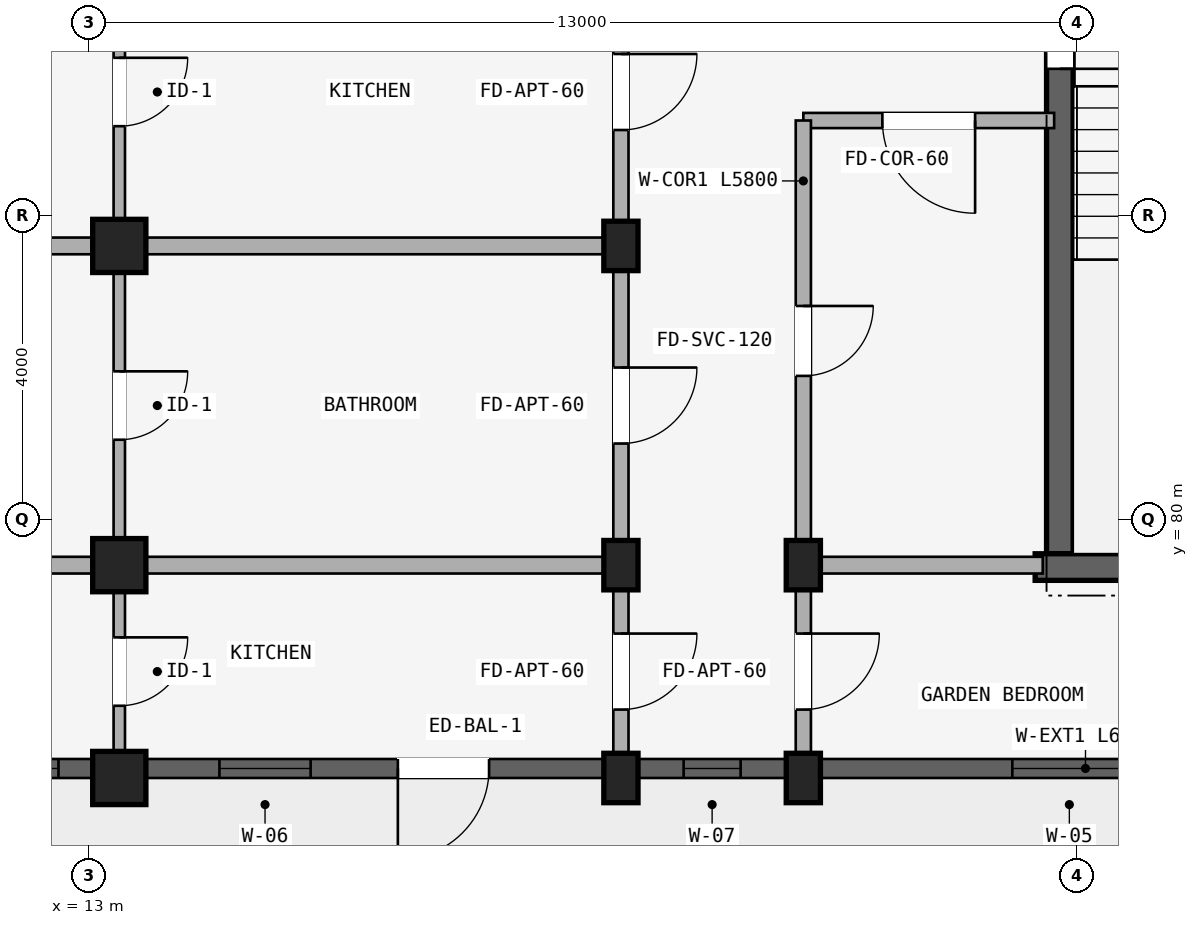
"""IFC4 building model, lengths in metres.
Left out: names, types, materials, properties, quantities, classifications, styles, units other than length and angle.
Written with IfcOpenShell. Run it as: python <this file> out.ifc"""

import sys

from ifc_helpers import new_model, si_unit, direction, frame, frame_2d, origin, origin_2d, place, context, subcontext, project, spatial, rectangle, extrude, element, fill, save


model = new_model("IFC4")
c1 = context("Model", 3, precision=1e-05, world=origin(), true_north=direction((0.0, 1.0)))
c2 = subcontext(c1, "Body", "Model", "MODEL_VIEW")
j1 = project(units=[si_unit("LENGTHUNIT", "METRE"), si_unit("PLANEANGLEUNIT", "RADIAN")], contexts=[c1])
p1 = place(None, origin())
s1 = spatial("IfcSite", under=j1, at=p1, CompositionType="ELEMENT")
p2 = place(p1, origin())
s2 = spatial("IfcBuilding", under=s1, at=p2, CompositionType="ELEMENT")
p3 = place(p2, frame((0.0, 0.0, 27.6)))
s3 = spatial("IfcBuildingStorey", under=s2, at=p3, CompositionType="ELEMENT", Elevation=27.6)
p4 = place(p3, frame((25.775, 87.45, 0.0), z_axis=(0.0, 0.0, 1.0), x_axis=(0.0, -1.0, 0.0)))
e1 = element("IfcWall", 1, at=p4, inside=s3, PredefinedType="SHEAR", context=c2, shape_type="SweptSolid", body=[
    extrude(rectangle(XDim=7.9, YDim=0.35, at=frame_2d((3.95, 0.0))), origin(), (0.0, 0.0, 1.0), 2.93),
])
p5 = place(p4, frame((0.28, 0.0, 0.0)))
e2 = element("IfcOpeningElement", 2, at=p5, cuts=e1, PredefinedType="OPENING", context=c2, shape_type="SweptSolid", body=[
    extrude(rectangle(XDim=1.24, YDim=2.15, at=frame_2d((0.62, 1.075))), frame((0.0, 0.185, 0.0), z_axis=(0.0, -1.0, 0.0), x_axis=(1.0, 0.0, 0.0)), (0.0, 0.0, 1.0), 0.37),
])
p6 = place(p3, frame((29.05, 79.375, 0.0), z_axis=(0.0, 0.0, 1.0), x_axis=(-1.0, 0.0, 0.0)))
e3 = element("IfcWall", 3, at=p6, inside=s3, PredefinedType="SHEAR", context=c2, shape_type="SweptSolid", body=[
    extrude(rectangle(XDim=3.6, YDim=0.35, at=frame_2d((1.8, 0.0))), origin(), (0.0, 0.0, 1.0), 2.93),
])
p7 = place(p3, frame((20.0, 83.6, 0.0), z_axis=(0.0, 0.0, 1.0), x_axis=(1.0, 0.0, 0.0)))
e4 = element("IfcColumn", 4, at=p7, inside=s3, PredefinedType="COLUMN", context=c2, shape_type="SweptSolid", body=[
    extrude(rectangle(XDim=0.45, YDim=0.65, at=origin_2d()), origin(), (0.0, 0.0, 1.0), 2.93),
])
p8 = place(p3, frame((13.4, 83.6, 0.0), z_axis=(0.0, 0.0, 1.0), x_axis=(1.0, 0.0, 0.0)))
e5 = element("IfcColumn", 5, at=p8, inside=s3, PredefinedType="COLUMN", context=c2, shape_type="SweptSolid", body=[
    extrude(rectangle(XDim=0.7, YDim=0.7, at=origin_2d()), origin(), (0.0, 0.0, 1.0), 2.93),
])
for number, where, z_axis, x_axis in (
    (6, (22.4, 79.4, 0.0), (0.0, 0.0, 1.0), (1.0, 0.0, 0.0)),
    (7, (20.0, 79.4, 0.0), (0.0, 0.0, 1.0), (1.0, 0.0, 0.0)),
):
    element("IfcColumn", number, at=place(p3, frame(where, z_axis=z_axis, x_axis=x_axis)), inside=s3, PredefinedType="COLUMN", context=c2, shape_type="SweptSolid", body=[
        extrude(rectangle(XDim=0.45, YDim=0.65, at=origin_2d()), origin(), (0.0, 0.0, 1.0), 2.93),
    ])
p9 = place(p3, frame((13.4, 79.4, 0.0), z_axis=(0.0, 0.0, 1.0), x_axis=(1.0, 0.0, 0.0)))
e8 = element("IfcColumn", 8, at=p9, inside=s3, PredefinedType="COLUMN", context=c2, shape_type="SweptSolid", body=[
    extrude(rectangle(XDim=0.7, YDim=0.7, at=origin_2d()), origin(), (0.0, 0.0, 1.0), 2.93),
])
for number, where, z_axis, x_axis in (
    (9, (22.4, 76.6, 0.0), (0.0, 0.0, 1.0), (1.0, 0.0, 0.0)),
    (10, (20.0, 76.6, 0.0), (0.0, 0.0, 1.0), (1.0, 0.0, 0.0)),
):
    element("IfcColumn", number, at=place(p3, frame(where, z_axis=z_axis, x_axis=x_axis)), inside=s3, PredefinedType="COLUMN", context=c2, shape_type="SweptSolid", body=[
        extrude(rectangle(XDim=0.45, YDim=0.65, at=origin_2d()), origin(), (0.0, 0.0, 1.0), 2.93),
    ])
p10 = place(p3, frame((13.4, 76.6, 0.0), z_axis=(0.0, 0.0, 1.0), x_axis=(1.0, 0.0, 0.0)))
e11 = element("IfcColumn", 11, at=p10, inside=s3, PredefinedType="COLUMN", context=c2, shape_type="SweptSolid", body=[
    extrude(rectangle(XDim=0.7, YDim=0.7, at=origin_2d()), origin(), (0.0, 0.0, 1.0), 2.93),
])
p11 = place(p3, frame((25.7, 85.25, 0.0), z_axis=(0.0, 0.0, 1.0), x_axis=(-1.0, 0.0, 0.0)))
e12 = element("IfcWall", 12, at=p11, inside=s3, PredefinedType="STANDARD", context=c2, shape_type="SweptSolid", body=[
    extrude(rectangle(XDim=3.3, YDim=0.2, at=frame_2d((1.65, 0.0))), origin(), (0.0, 0.0, 1.0), 2.372),
])
p12 = place(p11, frame((1.04, 0.0, 0.0)))
e13 = element("IfcOpeningElement", 13, at=p12, cuts=e12, PredefinedType="OPENING", context=c2, shape_type="SweptSolid", body=[
    extrude(rectangle(XDim=1.22, YDim=2.15, at=frame_2d((0.61, 1.075))), frame((0.0, 0.11, 0.0), z_axis=(0.0, -1.0, 0.0), x_axis=(1.0, 0.0, 0.0)), (0.0, 0.0, 1.0), 0.22),
])
p13 = place(p3, frame((22.4, 85.25, 0.0), z_axis=(0.0, 0.0, 1.0), x_axis=(0.0, -1.0, 0.0)))
e14 = element("IfcWall", 14, at=p13, inside=s3, PredefinedType="STANDARD", context=c2, shape_type="SweptSolid", body=[
    extrude(rectangle(XDim=5.8, YDim=0.2, at=frame_2d((2.9, 0.0))), origin(), (0.0, 0.0, 1.0), 2.372),
])
p14 = place(p13, frame((2.44, 0.0, 0.0)))
e15 = element("IfcOpeningElement", 15, at=p14, cuts=e14, PredefinedType="OPENING", context=c2, shape_type="SweptSolid", body=[
    extrude(rectangle(XDim=0.92, YDim=2.1, at=frame_2d((0.46, 1.05))), frame((0.0, 0.11, 0.0), z_axis=(0.0, -1.0, 0.0), x_axis=(1.0, 0.0, 0.0)), (0.0, 0.0, 1.0), 0.22),
])
p15 = place(p3, frame((20.0, 87.65, 0.0), z_axis=(0.0, 0.0, 1.0), x_axis=(0.0, -1.0, 0.0)))
e16 = element("IfcWall", 16, at=p15, inside=s3, PredefinedType="STANDARD", context=c2, shape_type="SweptSolid", body=[
    extrude(rectangle(XDim=4.05, YDim=0.2, at=frame_2d((2.025, 0.0))), origin(), (0.0, 0.0, 1.0), 2.372),
])
p16 = place(p15, frame((1.525, 0.0, 0.0)))
e17 = element("IfcOpeningElement", 17, at=p16, cuts=e16, PredefinedType="OPENING", context=c2, shape_type="SweptSolid", body=[
    extrude(rectangle(XDim=1.0, YDim=2.15, at=frame_2d((0.5, 1.075))), frame((0.0, 0.11, 0.0), z_axis=(0.0, -1.0, 0.0), x_axis=(1.0, 0.0, 0.0)), (0.0, 0.0, 1.0), 0.22),
])
p17 = place(p3, frame((13.4, 87.57, 0.0), z_axis=(0.0, 0.0, 1.0), x_axis=(0.0, -1.0, 0.0)))
e18 = element("IfcWall", 18, at=p17, inside=s3, PredefinedType="PARTITIONING", context=c2, shape_type="SweptSolid", body=[
    extrude(rectangle(XDim=3.89, YDim=0.15, at=frame_2d((1.945, 0.0))), origin(), (0.0, 0.0, 1.0), 2.372),
])
p18 = place(p17, frame((1.495, 0.0, 0.0)))
e19 = element("IfcOpeningElement", 19, at=p18, cuts=e18, PredefinedType="OPENING", context=c2, shape_type="SweptSolid", body=[
    extrude(rectangle(XDim=0.9, YDim=2.1, at=frame_2d((0.45, 1.05))), frame((0.0, 0.085, 0.0), z_axis=(0.0, -1.0, 0.0), x_axis=(1.0, 0.0, 0.0)), (0.0, 0.0, 1.0), 0.17),
])
p19 = place(p3, frame((20.0, 83.6, 0.0), z_axis=(0.0, 0.0, 1.0), x_axis=(0.0, -1.0, 0.0)))
e20 = element("IfcWall", 20, at=p19, inside=s3, PredefinedType="STANDARD", context=c2, shape_type="SweptSolid", body=[
    extrude(rectangle(XDim=4.2, YDim=0.2, at=frame_2d((2.1, 0.0))), origin(), (0.0, 0.0, 1.0), 2.372),
])
p20 = place(p19, frame((1.6, 0.0, 0.0)))
e21 = element("IfcOpeningElement", 21, at=p20, cuts=e20, PredefinedType="OPENING", context=c2, shape_type="SweptSolid", body=[
    extrude(rectangle(XDim=1.0, YDim=2.15, at=frame_2d((0.5, 1.075))), frame((0.0, 0.11, 0.0), z_axis=(0.0, -1.0, 0.0), x_axis=(1.0, 0.0, 0.0)), (0.0, 0.0, 1.0), 0.22),
])
p21 = place(p3, frame((13.4, 83.52, 0.0), z_axis=(0.0, 0.0, 1.0), x_axis=(0.0, -1.0, 0.0)))
e22 = element("IfcWall", 22, at=p21, inside=s3, PredefinedType="PARTITIONING", context=c2, shape_type="SweptSolid", body=[
    extrude(rectangle(XDim=4.04, YDim=0.15, at=frame_2d((2.02, 0.0))), origin(), (0.0, 0.0, 1.0), 2.372),
])
p22 = place(p21, frame((1.57, 0.0, 0.0)))
e23 = element("IfcOpeningElement", 23, at=p22, cuts=e22, PredefinedType="OPENING", context=c2, shape_type="SweptSolid", body=[
    extrude(rectangle(XDim=0.9, YDim=2.1, at=frame_2d((0.45, 1.05))), frame((0.0, 0.085, 0.0), z_axis=(0.0, -1.0, 0.0), x_axis=(1.0, 0.0, 0.0)), (0.0, 0.0, 1.0), 0.17),
])
p23 = place(p3, frame((19.95, 83.6, 0.0), z_axis=(0.0, 0.0, 1.0), x_axis=(-1.0, 0.0, 0.0)))
e24 = element("IfcWall", 24, at=p23, inside=s3, PredefinedType="STANDARD", context=c2, shape_type="SweptSolid", body=[
    extrude(rectangle(XDim=17.53, YDim=0.22, at=frame_2d((8.765, 0.0))), origin(), (0.0, 0.0, 1.0), 2.372),
])
p24 = place(p3, frame((22.4, 79.4, 0.0), z_axis=(0.0, 0.0, 1.0), x_axis=(0.0, -1.0, 0.0)))
e25 = element("IfcWall", 25, at=p24, inside=s3, PredefinedType="STANDARD", context=c2, shape_type="SweptSolid", body=[
    extrude(rectangle(XDim=2.8, YDim=0.2, at=frame_2d((1.4, 0.0))), origin(), (0.0, 0.0, 1.0), 2.372),
])
p25 = place(p24, frame((0.9, 0.0, 0.0)))
e26 = element("IfcOpeningElement", 26, at=p25, cuts=e25, PredefinedType="OPENING", context=c2, shape_type="SweptSolid", body=[
    extrude(rectangle(XDim=1.0, YDim=2.15, at=frame_2d((0.5, 1.075))), frame((0.0, 0.11, 0.0), z_axis=(0.0, -1.0, 0.0), x_axis=(1.0, 0.0, 0.0)), (0.0, 0.0, 1.0), 0.22),
])
p26 = place(p3, frame((20.0, 79.4, 0.0), z_axis=(0.0, 0.0, 1.0), x_axis=(0.0, -1.0, 0.0)))
e27 = element("IfcWall", 27, at=p26, inside=s3, PredefinedType="STANDARD", context=c2, shape_type="SweptSolid", body=[
    extrude(rectangle(XDim=2.8, YDim=0.2, at=frame_2d((1.4, 0.0))), origin(), (0.0, 0.0, 1.0), 2.372),
])
p27 = place(p26, frame((0.9, 0.0, 0.0)))
e28 = element("IfcOpeningElement", 28, at=p27, cuts=e27, PredefinedType="OPENING", context=c2, shape_type="SweptSolid", body=[
    extrude(rectangle(XDim=1.0, YDim=2.15, at=frame_2d((0.5, 1.075))), frame((0.0, 0.11, 0.0), z_axis=(0.0, -1.0, 0.0), x_axis=(1.0, 0.0, 0.0)), (0.0, 0.0, 1.0), 0.22),
])
p28 = place(p3, frame((13.4, 79.32, 0.0), z_axis=(0.0, 0.0, 1.0), x_axis=(0.0, -1.0, 0.0)))
e29 = element("IfcWall", 29, at=p28, inside=s3, PredefinedType="PLUMBINGWALL", context=c2, shape_type="SweptSolid", body=[
    extrude(rectangle(XDim=2.64, YDim=0.15, at=frame_2d((1.32, 0.0))), origin(), (0.0, 0.0, 1.0), 2.372),
])
p29 = place(p28, frame((0.87, 0.0, 0.0)))
e30 = element("IfcOpeningElement", 30, at=p29, cuts=e29, PredefinedType="OPENING", context=c2, shape_type="SweptSolid", body=[
    extrude(rectangle(XDim=0.9, YDim=2.1, at=frame_2d((0.45, 1.05))), frame((0.0, 0.085, 0.0), z_axis=(0.0, -1.0, 0.0), x_axis=(1.0, 0.0, 0.0)), (0.0, 0.0, 1.0), 0.17),
])
p30 = place(p3, frame((25.55, 79.4, 0.0), z_axis=(0.0, 0.0, 1.0), x_axis=(-1.0, 0.0, 0.0)))
e31 = element("IfcWall", 31, at=p30, inside=s3, PredefinedType="STANDARD", context=c2, shape_type="SweptSolid", body=[
    extrude(rectangle(XDim=3.1, YDim=0.22, at=frame_2d((1.55, 0.0))), origin(), (0.0, 0.0, 1.0), 2.372),
])
p31 = place(p3, frame((19.9, 79.4, 0.0), z_axis=(0.0, 0.0, 1.0), x_axis=(-1.0, 0.0, 0.0)))
e32 = element("IfcWall", 32, at=p31, inside=s3, PredefinedType="STANDARD", context=c2, shape_type="SweptSolid", body=[
    extrude(rectangle(XDim=17.42, YDim=0.22, at=frame_2d((8.71, 0.0))), origin(), (0.0, 0.0, 1.0), 2.372),
])
p32 = place(p3, frame((29.046, 76.725, 0.0), z_axis=(0.0, 0.0, 1.0), x_axis=(-1.0, 0.0, 0.0)))
e33 = element("IfcWall", 33, at=p32, inside=s3, PredefinedType="STANDARD", context=c2, shape_type="SweptSolid", body=[
    extrude(rectangle(XDim=6.418, YDim=0.25, at=frame_2d((3.209, 0.0))), origin(), (0.0, 0.0, 1.0), 2.372),
])
p33 = place(p32, frame((2.396, 0.0, 0.522)))
e34 = element("IfcOpeningElement", 34, at=p33, cuts=e33, PredefinedType="OPENING", context=c2, shape_type="SweptSolid", body=[
    extrude(rectangle(XDim=1.5, YDim=1.65, at=frame_2d((0.75, 0.825))), frame((0.0, 0.135, 0.0), z_axis=(0.0, -1.0, 0.0), x_axis=(1.0, 0.0, 0.0)), (0.0, 0.0, 1.0), 0.27),
])
p34 = place(p3, frame((22.171, 76.725, 0.0), z_axis=(0.0, 0.0, 1.0), x_axis=(-1.0, 0.0, 0.0)))
e35 = element("IfcWall", 35, at=p34, inside=s3, PredefinedType="STANDARD", context=c2, shape_type="SweptSolid", body=[
    extrude(rectangle(XDim=1.943, YDim=0.25, at=frame_2d((0.971, 0.0))), origin(), (0.0, 0.0, 1.0), 2.372),
])
p35 = place(p34, frame((0.596, 0.0, 0.88)))
e36 = element("IfcOpeningElement", 36, at=p35, cuts=e35, PredefinedType="OPENING", context=c2, shape_type="SweptSolid", body=[
    extrude(rectangle(XDim=0.75, YDim=1.05, at=frame_2d((0.375, 0.525))), frame((0.0, 0.135, 0.0), z_axis=(0.0, -1.0, 0.0), x_axis=(1.0, 0.0, 0.0)), (0.0, 0.0, 1.0), 0.27),
])
p36 = place(p3, frame((19.771, 76.725, 0.0), z_axis=(0.0, 0.0, 1.0), x_axis=(-1.0, 0.0, 0.0)))
e37 = element("IfcWall", 37, at=p36, inside=s3, PredefinedType="STANDARD", context=c2, shape_type="SweptSolid", body=[
    extrude(rectangle(XDim=6.018, YDim=0.25, at=frame_2d((3.009, 0.0))), origin(), (0.0, 0.0, 1.0), 2.372),
])
p37 = place(p36, frame((3.854, 0.0, 0.522)))
e38 = element("IfcOpeningElement", 38, at=p37, cuts=e37, PredefinedType="OPENING", context=c2, shape_type="SweptSolid", body=[
    extrude(rectangle(XDim=1.2, YDim=1.5, at=frame_2d((0.6, 0.75))), frame((0.0, 0.135, 0.0), z_axis=(0.0, -1.0, 0.0), x_axis=(1.0, 0.0, 0.0)), (0.0, 0.0, 1.0), 0.27),
])
p38 = place(p36, frame((1.506, 0.0, 0.0)))
e39 = element("IfcOpeningElement", 39, at=p38, cuts=e37, PredefinedType="OPENING", context=c2, shape_type="SweptSolid", body=[
    extrude(rectangle(XDim=1.2, YDim=2.15, at=frame_2d((0.6, 1.075))), frame((0.0, 0.135, 0.0), z_axis=(0.0, -1.0, 0.0), x_axis=(1.0, 0.0, 0.0)), (0.0, 0.0, 1.0), 0.27),
])
p39 = place(p3, frame((13.046, 76.725, 0.0), z_axis=(0.0, 0.0, 1.0), x_axis=(-1.0, 0.0, 0.0)))
e40 = element("IfcWall", 40, at=p39, inside=s3, PredefinedType="STANDARD", context=c2, shape_type="SweptSolid", body=[
    extrude(rectangle(XDim=2.093, YDim=0.25, at=frame_2d((1.046, 0.0))), origin(), (0.0, 0.0, 1.0), 2.372),
])
p40 = place(p39, frame((0.447, 0.0, 0.672)))
e41 = element("IfcOpeningElement", 41, at=p40, cuts=e40, PredefinedType="OPENING", context=c2, shape_type="SweptSolid", body=[
    extrude(rectangle(XDim=1.2, YDim=1.5, at=frame_2d((0.6, 0.75))), frame((0.0, 0.135, 0.0), z_axis=(0.0, -1.0, 0.0), x_axis=(1.0, 0.0, 0.0)), (0.0, 0.0, 1.0), 0.27),
])
p41 = place(p33, origin())
e42 = element("IfcWindow", 42, at=p41, inside=s3, PartitioningType="DOUBLE_PANEL_VERTICAL", PredefinedType="WINDOW", context=c2, shape_type="SweptSolid", body=[
    extrude(rectangle(XDim=1.5, YDim=1.65, at=frame_2d((0.75, 0.825))), frame((0.0, 0.03, 0.0), z_axis=(0.0, -1.0, 0.0), x_axis=(1.0, 0.0, 0.0)), (0.0, 0.0, 1.0), 0.06),
])
fill(e34, e42)
p42 = place(p35, origin())
e43 = element("IfcWindow", 43, at=p42, inside=s3, PartitioningType="SINGLE_PANEL", PredefinedType="WINDOW", context=c2, shape_type="SweptSolid", body=[
    extrude(rectangle(XDim=0.75, YDim=1.05, at=frame_2d((0.375, 0.525))), frame((0.0, 0.03, 0.0), z_axis=(0.0, -1.0, 0.0), x_axis=(1.0, 0.0, 0.0)), (0.0, 0.0, 1.0), 0.06),
])
fill(e36, e43)
p43 = place(p37, origin())
e44 = element("IfcWindow", 44, at=p43, inside=s3, PartitioningType="SINGLE_PANEL", PredefinedType="WINDOW", context=c2, shape_type="SweptSolid", body=[
    extrude(rectangle(XDim=1.2, YDim=1.5, at=frame_2d((0.6, 0.75))), frame((0.0, 0.03, 0.0), z_axis=(0.0, -1.0, 0.0), x_axis=(1.0, 0.0, 0.0)), (0.0, 0.0, 1.0), 0.06),
])
fill(e38, e44)
p44 = place(p40, origin())
e45 = element("IfcWindow", 45, at=p44, inside=s3, PartitioningType="SINGLE_PANEL", PredefinedType="WINDOW", context=c2, shape_type="SweptSolid", body=[
    extrude(rectangle(XDim=1.2, YDim=1.5, at=frame_2d((0.6, 0.75))), frame((0.0, 0.03, 0.0), z_axis=(0.0, -1.0, 0.0), x_axis=(1.0, 0.0, 0.0)), (0.0, 0.0, 1.0), 0.06),
])
fill(e41, e45)
p45 = place(p5, origin())
e46 = element("IfcDoor", 46, at=p45, inside=s3, OperationType="SINGLE_SWING_RIGHT", PredefinedType="DOOR", context=c2, shape_type="SweptSolid", body=[
    extrude(rectangle(XDim=1.24, YDim=2.15, at=frame_2d((0.62, 1.075))), frame((0.0, 0.025, 0.0), z_axis=(0.0, -1.0, 0.0), x_axis=(1.0, 0.0, 0.0)), (0.0, 0.0, 1.0), 0.05),
])
fill(e2, e46)
p46 = place(p12, frame((1.22, 0.0, 0.0), z_axis=(0.0, 0.0, 1.0), x_axis=(-1.0, 0.0, 0.0)))
e47 = element("IfcDoor", 47, at=p46, inside=s3, OperationType="SINGLE_SWING_RIGHT", PredefinedType="DOOR", context=c2, shape_type="SweptSolid", body=[
    extrude(rectangle(XDim=1.22, YDim=2.15, at=frame_2d((0.61, 1.075))), frame((0.0, 0.025, 0.0), z_axis=(0.0, -1.0, 0.0), x_axis=(1.0, 0.0, 0.0)), (0.0, 0.0, 1.0), 0.05),
])
fill(e13, e47)
p47 = place(p14, origin())
e48 = element("IfcDoor", 48, at=p47, inside=s3, OperationType="SINGLE_SWING_LEFT", PredefinedType="DOOR", context=c2, shape_type="SweptSolid", body=[
    extrude(rectangle(XDim=0.92, YDim=2.1, at=frame_2d((0.46, 1.05))), frame((0.0, 0.025, 0.0), z_axis=(0.0, -1.0, 0.0), x_axis=(1.0, 0.0, 0.0)), (0.0, 0.0, 1.0), 0.05),
])
fill(e15, e48)
p48 = place(p16, origin())
e49 = element("IfcDoor", 49, at=p48, inside=s3, OperationType="SINGLE_SWING_LEFT", PredefinedType="DOOR", context=c2, shape_type="SweptSolid", body=[
    extrude(rectangle(XDim=1.0, YDim=2.15, at=frame_2d((0.5, 1.075))), frame((0.0, 0.025, 0.0), z_axis=(0.0, -1.0, 0.0), x_axis=(1.0, 0.0, 0.0)), (0.0, 0.0, 1.0), 0.05),
])
fill(e17, e49)
p49 = place(p18, frame((0.9, 0.0, 0.0), z_axis=(0.0, 0.0, 1.0), x_axis=(-1.0, 0.0, 0.0)))
e50 = element("IfcDoor", 50, at=p49, inside=s3, OperationType="SINGLE_SWING_RIGHT", PredefinedType="DOOR", context=c2, shape_type="SweptSolid", body=[
    extrude(rectangle(XDim=0.9, YDim=2.1, at=frame_2d((0.45, 1.05))), frame((0.0, 0.025, 0.0), z_axis=(0.0, -1.0, 0.0), x_axis=(1.0, 0.0, 0.0)), (0.0, 0.0, 1.0), 0.05),
])
fill(e19, e50)
p50 = place(p20, origin())
e51 = element("IfcDoor", 51, at=p50, inside=s3, OperationType="SINGLE_SWING_LEFT", PredefinedType="DOOR", context=c2, shape_type="SweptSolid", body=[
    extrude(rectangle(XDim=1.0, YDim=2.15, at=frame_2d((0.5, 1.075))), frame((0.0, 0.025, 0.0), z_axis=(0.0, -1.0, 0.0), x_axis=(1.0, 0.0, 0.0)), (0.0, 0.0, 1.0), 0.05),
])
fill(e21, e51)
p51 = place(p22, frame((0.9, 0.0, 0.0), z_axis=(0.0, 0.0, 1.0), x_axis=(-1.0, 0.0, 0.0)))
e52 = element("IfcDoor", 52, at=p51, inside=s3, OperationType="SINGLE_SWING_RIGHT", PredefinedType="DOOR", context=c2, shape_type="SweptSolid", body=[
    extrude(rectangle(XDim=0.9, YDim=2.1, at=frame_2d((0.45, 1.05))), frame((0.0, 0.025, 0.0), z_axis=(0.0, -1.0, 0.0), x_axis=(1.0, 0.0, 0.0)), (0.0, 0.0, 1.0), 0.05),
])
fill(e23, e52)
p52 = place(p25, origin())
e53 = element("IfcDoor", 53, at=p52, inside=s3, OperationType="SINGLE_SWING_LEFT", PredefinedType="DOOR", context=c2, shape_type="SweptSolid", body=[
    extrude(rectangle(XDim=1.0, YDim=2.15, at=frame_2d((0.5, 1.075))), frame((0.0, 0.025, 0.0), z_axis=(0.0, -1.0, 0.0), x_axis=(1.0, 0.0, 0.0)), (0.0, 0.0, 1.0), 0.05),
])
fill(e26, e53)
p53 = place(p29, frame((0.9, 0.0, 0.0), z_axis=(0.0, 0.0, 1.0), x_axis=(-1.0, 0.0, 0.0)))
e54 = element("IfcDoor", 54, at=p53, inside=s3, OperationType="SINGLE_SWING_RIGHT", PredefinedType="DOOR", context=c2, shape_type="SweptSolid", body=[
    extrude(rectangle(XDim=0.9, YDim=2.1, at=frame_2d((0.45, 1.05))), frame((0.0, 0.025, 0.0), z_axis=(0.0, -1.0, 0.0), x_axis=(1.0, 0.0, 0.0)), (0.0, 0.0, 1.0), 0.05),
])
fill(e30, e54)
p54 = place(p27, origin())
e55 = element("IfcDoor", 55, at=p54, inside=s3, OperationType="SINGLE_SWING_LEFT", PredefinedType="DOOR", context=c2, shape_type="SweptSolid", body=[
    extrude(rectangle(XDim=1.0, YDim=2.15, at=frame_2d((0.5, 1.075))), frame((0.0, 0.025, 0.0), z_axis=(0.0, -1.0, 0.0), x_axis=(1.0, 0.0, 0.0)), (0.0, 0.0, 1.0), 0.05),
])
fill(e28, e55)
p55 = place(p38, origin())
e56 = element("IfcDoor", 56, at=p55, inside=s3, OperationType="SINGLE_SWING_RIGHT", PredefinedType="DOOR", context=c2, shape_type="SweptSolid", body=[
    extrude(rectangle(XDim=1.2, YDim=2.15, at=frame_2d((0.6, 1.075))), frame((0.0, 0.025, 0.0), z_axis=(0.0, -1.0, 0.0), x_axis=(1.0, 0.0, 0.0)), (0.0, 0.0, 1.0), 0.05),
])
fill(e39, e56)
save(model, sys.argv[1])
